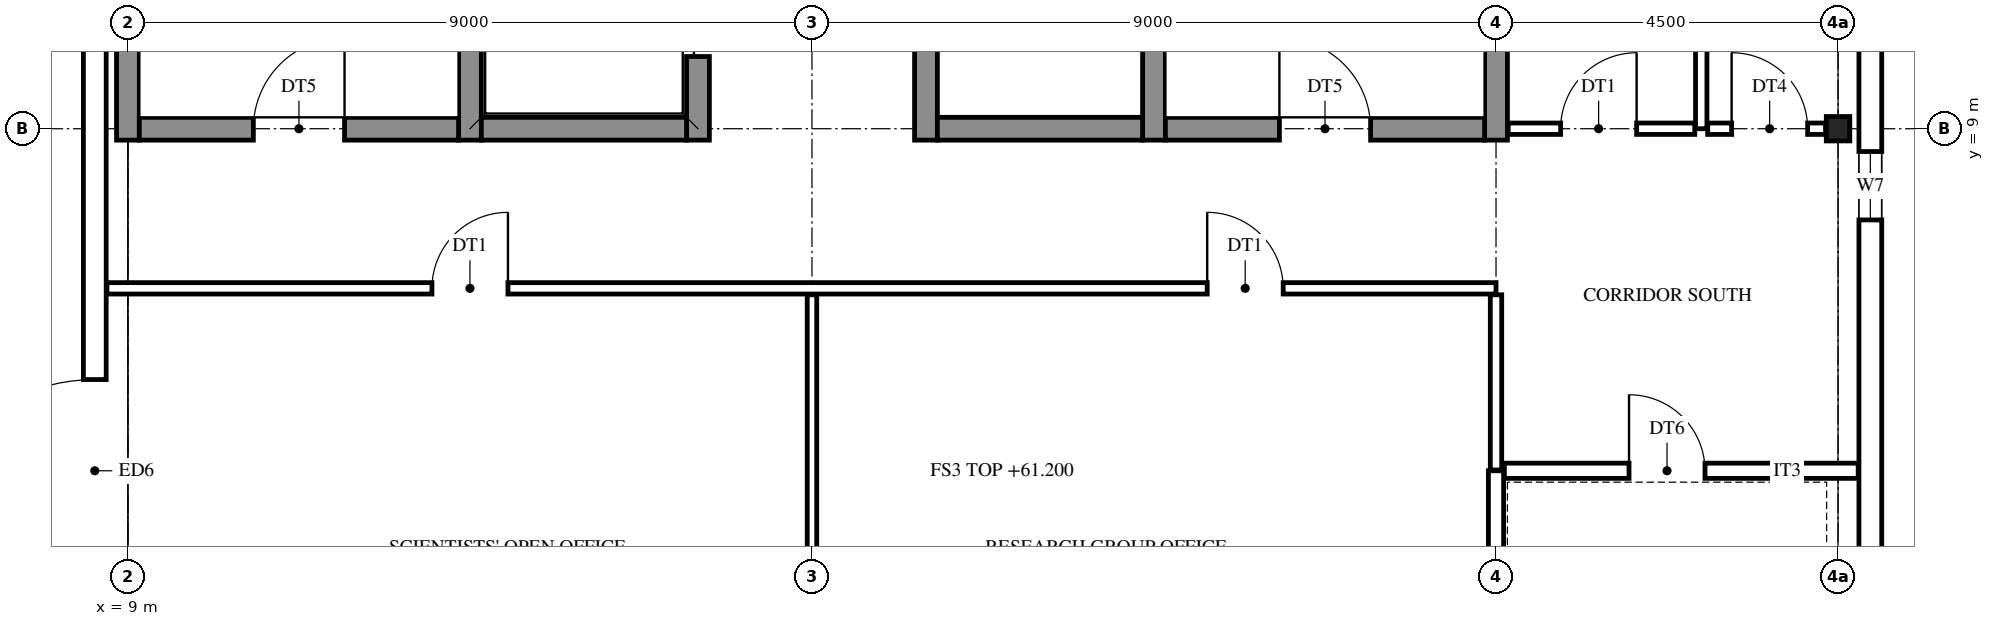
"""IFC4 building model, lengths in metres.
Left out: names, types, materials, properties, quantities, classifications, styles, units other than length and angle.
Written with IfcOpenShell. Run it as: python <this file> out.ifc"""

import sys

from ifc_helpers import new_model, si_unit, direction, frame, frame_2d, origin, origin_2d, place, context, subcontext, project, spatial, rectangle, i_section, extrude, element, fill, save


model = new_model("IFC4")
c1 = context("Model", 3, precision=1e-05, world=origin(), true_north=direction((0.0, 1.0)))
c2 = subcontext(c1, "Body", "Model", "MODEL_VIEW")
j1 = project(units=[si_unit("LENGTHUNIT", "METRE"), si_unit("PLANEANGLEUNIT", "RADIAN")], contexts=[c1])
p1 = place(None, origin())
s1 = spatial("IfcSite", under=j1, at=p1, CompositionType="ELEMENT")
p2 = place(p1, origin())
s2 = spatial("IfcBuilding", under=s1, at=p2, CompositionType="ELEMENT")
p3 = place(p2, frame((0.0, 0.0, 61.2)))
s3 = spatial("IfcBuildingStorey", under=s2, at=p3, CompositionType="ELEMENT", Elevation=61.2)
p4 = place(p3, frame((31.5, 9.0, 0.0), z_axis=(0.0, 0.0, 1.0), x_axis=(1.0, 0.0, 0.0)))
e1 = element("IfcColumn", 1, at=p4, inside=s3, PredefinedType="COLUMN", context=c2, shape_type="SweptSolid", body=[
    extrude(i_section(OverallWidth=0.309, OverallDepth=0.321, WebThickness=0.014, FlangeThickness=0.022, FilletRadius=0.017, at=origin_2d()), origin(), (0.0, 0.0, 1.0), 4.2),
])
for number, where, z_axis, x_axis in (
    (2, (9.0, 8.85, 0.0), (0.0, 0.0, 1.0), (0.0, 1.0, 0.0)),
    (3, (13.5, 8.85, 0.0), (0.0, 0.0, 1.0), (0.0, 1.0, 0.0)),
):
    element("IfcWall", number, at=place(p3, frame(where, z_axis=z_axis, x_axis=x_axis)), inside=s3, PredefinedType="SHEAR", context=c2, shape_type="SweptSolid", body=[
        extrude(rectangle(XDim=9.3, YDim=0.3, at=frame_2d((4.65, 0.0))), origin(), (0.0, 0.0, 1.0), 4.2),
    ])
p5 = place(p3, frame((16.5, 8.85, 0.0), z_axis=(0.0, 0.0, 1.0), x_axis=(0.0, 1.0, 0.0)))
e4 = element("IfcWall", 4, at=p5, inside=s3, PredefinedType="SHEAR", context=c2, shape_type="SweptSolid", body=[
    extrude(rectangle(XDim=9.3, YDim=0.3, at=frame_2d((4.65, 0.0))), origin(), (0.0, 0.0, 1.0), 4.2),
])
p6 = place(p5, frame((1.1, 0.0, 0.0)))
e5 = element("IfcOpeningElement", 5, at=p6, cuts=e4, PredefinedType="OPENING", context=c2, shape_type="SweptSolid", body=[
    extrude(rectangle(XDim=1.1, YDim=2.1, at=frame_2d((0.55, 1.05))), frame((0.0, 0.16, 0.0), z_axis=(0.0, -1.0, 0.0), x_axis=(1.0, 0.0, 0.0)), (0.0, 0.0, 1.0), 0.32),
])
p7 = place(p5, frame((4.1, 0.0, 0.0)))
e6 = element("IfcOpeningElement", 6, at=p7, cuts=e4, PredefinedType="OPENING", context=c2, shape_type="SweptSolid", body=[
    extrude(rectangle(XDim=1.1, YDim=2.1, at=frame_2d((0.55, 1.05))), frame((0.0, 0.16, 0.0), z_axis=(0.0, -1.0, 0.0), x_axis=(1.0, 0.0, 0.0)), (0.0, 0.0, 1.0), 0.32),
])
p8 = place(p3, frame((19.5, 8.85, 0.0), z_axis=(0.0, 0.0, 1.0), x_axis=(0.0, 1.0, 0.0)))
e7 = element("IfcWall", 7, at=p8, inside=s3, PredefinedType="SHEAR", context=c2, shape_type="SweptSolid", body=[
    extrude(rectangle(XDim=9.3, YDim=0.3, at=frame_2d((4.65, 0.0))), origin(), (0.0, 0.0, 1.0), 4.2),
])
p9 = place(p8, frame((3.95, 0.0, 0.0)))
e8 = element("IfcOpeningElement", 8, at=p9, cuts=e7, PredefinedType="OPENING", context=c2, shape_type="SweptSolid", body=[
    extrude(rectangle(XDim=1.4, YDim=2.1, at=frame_2d((0.7, 1.05))), frame((0.0, 0.16, 0.0), z_axis=(0.0, -1.0, 0.0), x_axis=(1.0, 0.0, 0.0)), (0.0, 0.0, 1.0), 0.32),
])
p10 = place(p8, frame((7.1, 0.0, 0.0)))
e9 = element("IfcOpeningElement", 9, at=p10, cuts=e7, PredefinedType="OPENING", context=c2, shape_type="SweptSolid", body=[
    extrude(rectangle(XDim=1.1, YDim=2.1, at=frame_2d((0.55, 1.05))), frame((0.0, 0.16, 0.0), z_axis=(0.0, -1.0, 0.0), x_axis=(1.0, 0.0, 0.0)), (0.0, 0.0, 1.0), 0.32),
])
for number, where, z_axis, x_axis in (
    (10, (22.5, 8.85, 0.0), (0.0, 0.0, 1.0), (0.0, 1.0, 0.0)),
    (11, (27.0, 8.85, 0.0), (0.0, 0.0, 1.0), (0.0, 1.0, 0.0)),
):
    element("IfcWall", number, at=place(p3, frame(where, z_axis=z_axis, x_axis=x_axis)), inside=s3, PredefinedType="SHEAR", context=c2, shape_type="SweptSolid", body=[
        extrude(rectangle(XDim=9.3, YDim=0.3, at=frame_2d((4.65, 0.0))), origin(), (0.0, 0.0, 1.0), 4.2),
    ])
p11 = place(p3, frame((9.15, 9.0, 0.0), z_axis=(0.0, 0.0, 1.0), x_axis=(1.0, 0.0, 0.0)))
e12 = element("IfcWall", 12, at=p11, inside=s3, PredefinedType="SHEAR", context=c2, shape_type="SweptSolid", body=[
    extrude(rectangle(XDim=4.2, YDim=0.3, at=frame_2d((2.1, 0.0))), origin(), (0.0, 0.0, 1.0), 4.2),
])
p12 = place(p11, frame((1.5, 0.0, 0.0)))
e13 = element("IfcOpeningElement", 13, at=p12, cuts=e12, PredefinedType="OPENING", context=c2, shape_type="SweptSolid", body=[
    extrude(rectangle(XDim=1.2, YDim=2.1, at=frame_2d((0.6, 1.05))), frame((0.0, 0.16, 0.0), z_axis=(0.0, -1.0, 0.0), x_axis=(1.0, 0.0, 0.0)), (0.0, 0.0, 1.0), 0.32),
])
for number, where, z_axis, x_axis in (
    (14, (13.65, 9.0, 0.0), (0.0, 0.0, 1.0), (1.0, 0.0, 0.0)),
    (15, (19.65, 9.0, 0.0), (0.0, 0.0, 1.0), (1.0, 0.0, 0.0)),
):
    element("IfcWall", number, at=place(p3, frame(where, z_axis=z_axis, x_axis=x_axis)), inside=s3, PredefinedType="SHEAR", context=c2, shape_type="SweptSolid", body=[
        extrude(rectangle(XDim=2.7, YDim=0.3, at=frame_2d((1.35, 0.0))), origin(), (0.0, 0.0, 1.0), 4.2),
    ])
p13 = place(p3, frame((22.65, 9.0, 0.0), z_axis=(0.0, 0.0, 1.0), x_axis=(1.0, 0.0, 0.0)))
e16 = element("IfcWall", 16, at=p13, inside=s3, PredefinedType="SHEAR", context=c2, shape_type="SweptSolid", body=[
    extrude(rectangle(XDim=4.2, YDim=0.3, at=frame_2d((2.1, 0.0))), origin(), (0.0, 0.0, 1.0), 4.2),
])
p14 = place(p13, frame((1.5, 0.0, 0.0)))
e17 = element("IfcOpeningElement", 17, at=p14, cuts=e16, PredefinedType="OPENING", context=c2, shape_type="SweptSolid", body=[
    extrude(rectangle(XDim=1.2, YDim=2.1, at=frame_2d((0.6, 1.05))), frame((0.0, 0.16, 0.0), z_axis=(0.0, -1.0, 0.0), x_axis=(1.0, 0.0, 0.0)), (0.0, 0.0, 1.0), 0.32),
])
p15 = place(p3, frame((8.564, -0.286, 0.0), z_axis=(0.0, 0.0, 1.0), x_axis=(0.0, 1.0, 0.0)))
e18 = element("IfcWall", 18, at=p15, inside=s3, PredefinedType="STANDARD", context=c2, shape_type="SweptSolid", body=[
    extrude(rectangle(XDim=27.572, YDim=0.3, at=frame_2d((13.786, 0.0))), origin(), (0.0, 0.0, 1.0), 4.2),
])
p16 = place(p15, frame((3.586, 0.0, 0.012)))
e19 = element("IfcOpeningElement", 19, at=p16, cuts=e18, PredefinedType="OPENING", context=c2, shape_type="SweptSolid", body=[
    extrude(rectangle(XDim=2.4, YDim=2.4, at=frame_2d((1.2, 1.2))), frame((0.0, 0.16, 0.0), z_axis=(0.0, -1.0, 0.0), x_axis=(1.0, 0.0, 0.0)), (0.0, 0.0, 1.0), 0.32),
])
p17 = place(p15, frame((21.586, 0.0, 0.012)))
e20 = element("IfcOpeningElement", 20, at=p17, cuts=e18, PredefinedType="OPENING", context=c2, shape_type="SweptSolid", body=[
    extrude(rectangle(XDim=2.4, YDim=2.4, at=frame_2d((1.2, 1.2))), frame((0.0, 0.16, 0.0), z_axis=(0.0, -1.0, 0.0), x_axis=(1.0, 0.0, 0.0)), (0.0, 0.0, 1.0), 0.32),
])
p18 = place(p3, frame((31.925, 27.275, 0.0), z_axis=(0.0, 0.0, 1.0), x_axis=(0.0, -1.0, 0.0)))
e21 = element("IfcWall", 21, at=p18, inside=s3, PredefinedType="STANDARD", context=c2, shape_type="SweptSolid", body=[
    extrude(rectangle(XDim=27.55, YDim=0.3, at=frame_2d((13.775, 0.0))), origin(), (0.0, 0.0, 1.0), 4.2),
])
p19 = place(p18, frame((26.075, 0.0, 0.6)))
e22 = element("IfcOpeningElement", 22, at=p19, cuts=e21, PredefinedType="OPENING", context=c2, shape_type="SweptSolid", body=[
    extrude(rectangle(XDim=0.9, YDim=2.3, at=frame_2d((0.45, 1.15))), frame((0.0, 0.16, 0.0), z_axis=(0.0, -1.0, 0.0), x_axis=(1.0, 0.0, 0.0)), (0.0, 0.0, 1.0), 0.32),
])
p20 = place(p18, frame((18.575, 0.0, 0.6)))
e23 = element("IfcOpeningElement", 23, at=p20, cuts=e21, PredefinedType="OPENING", context=c2, shape_type="SweptSolid", body=[
    extrude(rectangle(XDim=0.9, YDim=2.3, at=frame_2d((0.45, 1.15))), frame((0.0, 0.16, 0.0), z_axis=(0.0, -1.0, 0.0), x_axis=(1.0, 0.0, 0.0)), (0.0, 0.0, 1.0), 0.32),
])
p21 = place(p18, frame((15.725, 0.0, 1.6)))
e24 = element("IfcOpeningElement", 24, at=p21, cuts=e21, PredefinedType="OPENING", context=c2, shape_type="SweptSolid", body=[
    extrude(rectangle(XDim=0.6, YDim=0.9, at=frame_2d((0.3, 0.45))), frame((0.0, 0.16, 0.0), z_axis=(0.0, -1.0, 0.0), x_axis=(1.0, 0.0, 0.0)), (0.0, 0.0, 1.0), 0.32),
])
p22 = place(p18, frame((11.225, 0.0, 1.6)))
e25 = element("IfcOpeningElement", 25, at=p22, cuts=e21, PredefinedType="OPENING", context=c2, shape_type="SweptSolid", body=[
    extrude(rectangle(XDim=0.6, YDim=0.9, at=frame_2d((0.3, 0.45))), frame((0.0, 0.16, 0.0), z_axis=(0.0, -1.0, 0.0), x_axis=(1.0, 0.0, 0.0)), (0.0, 0.0, 1.0), 0.32),
])
p23 = place(p18, frame((8.075, 0.0, 0.6)))
e26 = element("IfcOpeningElement", 26, at=p23, cuts=e21, PredefinedType="OPENING", context=c2, shape_type="SweptSolid", body=[
    extrude(rectangle(XDim=0.9, YDim=2.3, at=frame_2d((0.45, 1.15))), frame((0.0, 0.16, 0.0), z_axis=(0.0, -1.0, 0.0), x_axis=(1.0, 0.0, 0.0)), (0.0, 0.0, 1.0), 0.32),
])
p24 = place(p18, frame((0.575, 0.0, 0.6)))
e27 = element("IfcOpeningElement", 27, at=p24, cuts=e21, PredefinedType="OPENING", context=c2, shape_type="SweptSolid", body=[
    extrude(rectangle(XDim=0.9, YDim=2.3, at=frame_2d((0.45, 1.15))), frame((0.0, 0.16, 0.0), z_axis=(0.0, -1.0, 0.0), x_axis=(1.0, 0.0, 0.0)), (0.0, 0.0, 1.0), 0.32),
])
p25 = place(p3, frame((18.0, 0.17, 0.0), z_axis=(0.0, 0.0, 1.0), x_axis=(0.0, 1.0, 0.0)))
e28 = element("IfcWall", 28, at=p25, inside=s3, PredefinedType="PARTITIONING", context=c2, shape_type="SweptSolid", body=[
    extrude(rectangle(XDim=6.645, YDim=0.125, at=frame_2d((3.322, 0.0))), origin(), (0.0, 0.0, 1.0), 3.537),
])
p26 = place(p3, frame((27.0, 0.17, 0.0), z_axis=(0.0, 0.0, 1.0), x_axis=(0.0, 1.0, 0.0)))
e29 = element("IfcWall", 29, at=p26, inside=s3, PredefinedType="PARTITIONING", context=c2, shape_type="SweptSolid", body=[
    extrude(rectangle(XDim=4.33, YDim=0.2, at=frame_2d((2.165, 0.0))), origin(), (0.0, 0.0, 1.0), 3.537),
])
p27 = place(p3, frame((27.0, 4.51, 0.0), z_axis=(0.0, 0.0, 1.0), x_axis=(0.0, 1.0, 0.0)))
e30 = element("IfcWall", 30, at=p27, inside=s3, PredefinedType="PARTITIONING", context=c2, shape_type="SweptSolid", body=[
    extrude(rectangle(XDim=2.305, YDim=0.15, at=frame_2d((1.152, 0.0))), origin(), (0.0, 0.0, 1.0), 3.537),
])
p28 = place(p3, frame((29.7, 9.0, 0.0), z_axis=(0.0, 0.0, 1.0), x_axis=(0.0, 1.0, 0.0)))
e31 = element("IfcWall", 31, at=p28, inside=s3, PredefinedType="PARTITIONING", context=c2, shape_type="SweptSolid", body=[
    extrude(rectangle(XDim=6.3, YDim=0.15, at=frame_2d((3.15, 0.0))), origin(), (0.0, 0.0, 1.0), 3.537),
])
p29 = place(p28, frame((4.0, 0.0, 0.0)))
e32 = element("IfcOpeningElement", 32, at=p29, cuts=e31, PredefinedType="OPENING", context=c2, shape_type="SweptSolid", body=[
    extrude(rectangle(XDim=1.0, YDim=2.1, at=frame_2d((0.5, 1.05))), frame((0.0, 0.085, 0.0), z_axis=(0.0, -1.0, 0.0), x_axis=(1.0, 0.0, 0.0)), (0.0, 0.0, 1.0), 0.17),
])
p30 = place(p3, frame((27.11, 4.5, 0.0), z_axis=(0.0, 0.0, 1.0), x_axis=(1.0, 0.0, 0.0)))
e33 = element("IfcWall", 33, at=p30, inside=s3, PredefinedType="PARTITIONING", context=c2, shape_type="SweptSolid", body=[
    extrude(rectangle(XDim=4.655, YDim=0.2, at=frame_2d((2.327, 0.0))), origin(), (0.0, 0.0, 1.0), 3.537),
])
p31 = place(p30, frame((1.64, 0.0, 0.0)))
e34 = element("IfcOpeningElement", 34, at=p31, cuts=e33, PredefinedType="OPENING", context=c2, shape_type="SweptSolid", body=[
    extrude(rectangle(XDim=1.0, YDim=2.1, at=frame_2d((0.5, 1.05))), frame((0.0, 0.11, 0.0), z_axis=(0.0, -1.0, 0.0), x_axis=(1.0, 0.0, 0.0)), (0.0, 0.0, 1.0), 0.22),
])
p32 = place(p3, frame((8.724, 6.9, 0.0), z_axis=(0.0, 0.0, 1.0), x_axis=(1.0, 0.0, 0.0)))
e35 = element("IfcWall", 35, at=p32, inside=s3, PredefinedType="PARTITIONING", context=c2, shape_type="SweptSolid", body=[
    extrude(rectangle(XDim=18.276, YDim=0.15, at=frame_2d((9.138, 0.0))), origin(), (0.0, 0.0, 1.0), 3.537),
])
p33 = place(p32, frame((4.276, 0.0, 0.0)))
e36 = element("IfcOpeningElement", 36, at=p33, cuts=e35, PredefinedType="OPENING", context=c2, shape_type="SweptSolid", body=[
    extrude(rectangle(XDim=1.0, YDim=2.1, at=frame_2d((0.5, 1.05))), frame((0.0, 0.085, 0.0), z_axis=(0.0, -1.0, 0.0), x_axis=(1.0, 0.0, 0.0)), (0.0, 0.0, 1.0), 0.17),
])
p34 = place(p32, frame((14.476, 0.0, 0.0)))
e37 = element("IfcOpeningElement", 37, at=p34, cuts=e35, PredefinedType="OPENING", context=c2, shape_type="SweptSolid", body=[
    extrude(rectangle(XDim=1.0, YDim=2.1, at=frame_2d((0.5, 1.05))), frame((0.0, 0.085, 0.0), z_axis=(0.0, -1.0, 0.0), x_axis=(1.0, 0.0, 0.0)), (0.0, 0.0, 1.0), 0.17),
])
p35 = place(p3, frame((27.16, 9.0, 0.0), z_axis=(0.0, 0.0, 1.0), x_axis=(1.0, 0.0, 0.0)))
e38 = element("IfcWall", 38, at=p35, inside=s3, PredefinedType="PARTITIONING", context=c2, shape_type="SweptSolid", body=[
    extrude(rectangle(XDim=2.455, YDim=0.15, at=frame_2d((1.228, 0.0))), origin(), (0.0, 0.0, 1.0), 3.537),
])
p36 = place(p35, frame((0.69, 0.0, 0.0)))
e39 = element("IfcOpeningElement", 39, at=p36, cuts=e38, PredefinedType="OPENING", context=c2, shape_type="SweptSolid", body=[
    extrude(rectangle(XDim=1.0, YDim=2.1, at=frame_2d((0.5, 1.05))), frame((0.0, 0.085, 0.0), z_axis=(0.0, -1.0, 0.0), x_axis=(1.0, 0.0, 0.0)), (0.0, 0.0, 1.0), 0.17),
])
p37 = place(p3, frame((29.785, 9.0, 0.0), z_axis=(0.0, 0.0, 1.0), x_axis=(1.0, 0.0, 0.0)))
e40 = element("IfcWall", 40, at=p37, inside=s3, PredefinedType="PARTITIONING", context=c2, shape_type="SweptSolid", body=[
    extrude(rectangle(XDim=1.551, YDim=0.15, at=frame_2d((0.775, 0.0))), origin(), (0.0, 0.0, 1.0), 3.537),
])
p38 = place(p37, frame((0.315, 0.0, 0.0)))
e41 = element("IfcOpeningElement", 41, at=p38, cuts=e40, PredefinedType="OPENING", context=c2, shape_type="SweptSolid", body=[
    extrude(rectangle(XDim=1.0, YDim=2.1, at=frame_2d((0.5, 1.05))), frame((0.0, 0.085, 0.0), z_axis=(0.0, -1.0, 0.0), x_axis=(1.0, 0.0, 0.0)), (0.0, 0.0, 1.0), 0.17),
])
p39 = place(p16, origin())
e42 = element("IfcDoor", 42, at=p39, inside=s3, OperationType="DOUBLE_DOOR_DOUBLE_SWING", PredefinedType="DOOR", context=c2, shape_type="SweptSolid", body=[
    extrude(rectangle(XDim=2.4, YDim=2.4, at=frame_2d((1.2, 1.2))), frame((0.0, 0.025, 0.0), z_axis=(0.0, -1.0, 0.0), x_axis=(1.0, 0.0, 0.0)), (0.0, 0.0, 1.0), 0.05),
])
fill(e19, e42)
p40 = place(p20, origin())
e43 = element("IfcWindow", 43, at=p40, inside=s3, PartitioningType="SINGLE_PANEL", PredefinedType="WINDOW", context=c2, shape_type="SweptSolid", body=[
    extrude(rectangle(XDim=0.9, YDim=2.3, at=frame_2d((0.45, 1.15))), frame((0.0, 0.03, 0.0), z_axis=(0.0, -1.0, 0.0), x_axis=(1.0, 0.0, 0.0)), (0.0, 0.0, 1.0), 0.06),
])
fill(e23, e43)
p41 = place(p12, origin())
e44 = element("IfcDoor", 44, at=p41, inside=s3, OperationType="SINGLE_SWING_RIGHT", PredefinedType="DOOR", context=c2, shape_type="SweptSolid", body=[
    extrude(rectangle(XDim=1.2, YDim=2.1, at=frame_2d((0.6, 1.05))), frame((0.0, 0.025, 0.0), z_axis=(0.0, -1.0, 0.0), x_axis=(1.0, 0.0, 0.0)), (0.0, 0.0, 1.0), 0.05),
])
fill(e13, e44)
p42 = place(p14, origin())
e45 = element("IfcDoor", 45, at=p42, inside=s3, OperationType="SINGLE_SWING_LEFT", PredefinedType="DOOR", context=c2, shape_type="SweptSolid", body=[
    extrude(rectangle(XDim=1.2, YDim=2.1, at=frame_2d((0.6, 1.05))), frame((0.0, 0.025, 0.0), z_axis=(0.0, -1.0, 0.0), x_axis=(1.0, 0.0, 0.0)), (0.0, 0.0, 1.0), 0.05),
])
fill(e17, e45)
p43 = place(p36, origin())
e46 = element("IfcDoor", 46, at=p43, inside=s3, OperationType="SINGLE_SWING_RIGHT", PredefinedType="DOOR", context=c2, shape_type="SweptSolid", body=[
    extrude(rectangle(XDim=1.0, YDim=2.1, at=frame_2d((0.5, 1.05))), frame((0.0, 0.025, 0.0), z_axis=(0.0, -1.0, 0.0), x_axis=(1.0, 0.0, 0.0)), (0.0, 0.0, 1.0), 0.05),
])
fill(e39, e46)
p44 = place(p38, origin())
e47 = element("IfcDoor", 47, at=p44, inside=s3, OperationType="SINGLE_SWING_LEFT", PredefinedType="DOOR", context=c2, shape_type="SweptSolid", body=[
    extrude(rectangle(XDim=1.0, YDim=2.1, at=frame_2d((0.5, 1.05))), frame((0.0, 0.025, 0.0), z_axis=(0.0, -1.0, 0.0), x_axis=(1.0, 0.0, 0.0)), (0.0, 0.0, 1.0), 0.05),
])
fill(e41, e47)
p45 = place(p31, frame((1.0, 0.0, 0.0), z_axis=(0.0, 0.0, 1.0), x_axis=(-1.0, 0.0, 0.0)))
e48 = element("IfcDoor", 48, at=p45, inside=s3, OperationType="SINGLE_SWING_LEFT", PredefinedType="DOOR", context=c2, shape_type="SweptSolid", body=[
    extrude(rectangle(XDim=1.0, YDim=2.1, at=frame_2d((0.5, 1.05))), frame((0.0, 0.025, 0.0), z_axis=(0.0, -1.0, 0.0), x_axis=(1.0, 0.0, 0.0)), (0.0, 0.0, 1.0), 0.05),
])
fill(e34, e48)
p46 = place(p33, frame((1.0, 0.0, 0.0), z_axis=(0.0, 0.0, 1.0), x_axis=(-1.0, 0.0, 0.0)))
e49 = element("IfcDoor", 49, at=p46, inside=s3, OperationType="SINGLE_SWING_RIGHT", PredefinedType="DOOR", context=c2, shape_type="SweptSolid", body=[
    extrude(rectangle(XDim=1.0, YDim=2.1, at=frame_2d((0.5, 1.05))), frame((0.0, 0.025, 0.0), z_axis=(0.0, -1.0, 0.0), x_axis=(1.0, 0.0, 0.0)), (0.0, 0.0, 1.0), 0.05),
])
fill(e36, e49)
p47 = place(p34, frame((1.0, 0.0, 0.0), z_axis=(0.0, 0.0, 1.0), x_axis=(-1.0, 0.0, 0.0)))
e50 = element("IfcDoor", 50, at=p47, inside=s3, OperationType="SINGLE_SWING_LEFT", PredefinedType="DOOR", context=c2, shape_type="SweptSolid", body=[
    extrude(rectangle(XDim=1.0, YDim=2.1, at=frame_2d((0.5, 1.05))), frame((0.0, 0.025, 0.0), z_axis=(0.0, -1.0, 0.0), x_axis=(1.0, 0.0, 0.0)), (0.0, 0.0, 1.0), 0.05),
])
fill(e37, e50)
p48 = place(p6, origin())
e51 = element("IfcDoor", 51, at=p48, inside=s3, OperationType="DOUBLE_DOOR_SLIDING", PredefinedType="DOOR", context=c2, shape_type="SweptSolid", body=[
    extrude(rectangle(XDim=1.1, YDim=2.1, at=frame_2d((0.55, 1.05))), frame((0.0, 0.025, 0.0), z_axis=(0.0, -1.0, 0.0), x_axis=(1.0, 0.0, 0.0)), (0.0, 0.0, 1.0), 0.05),
])
fill(e5, e51)
save(model, sys.argv[1])
